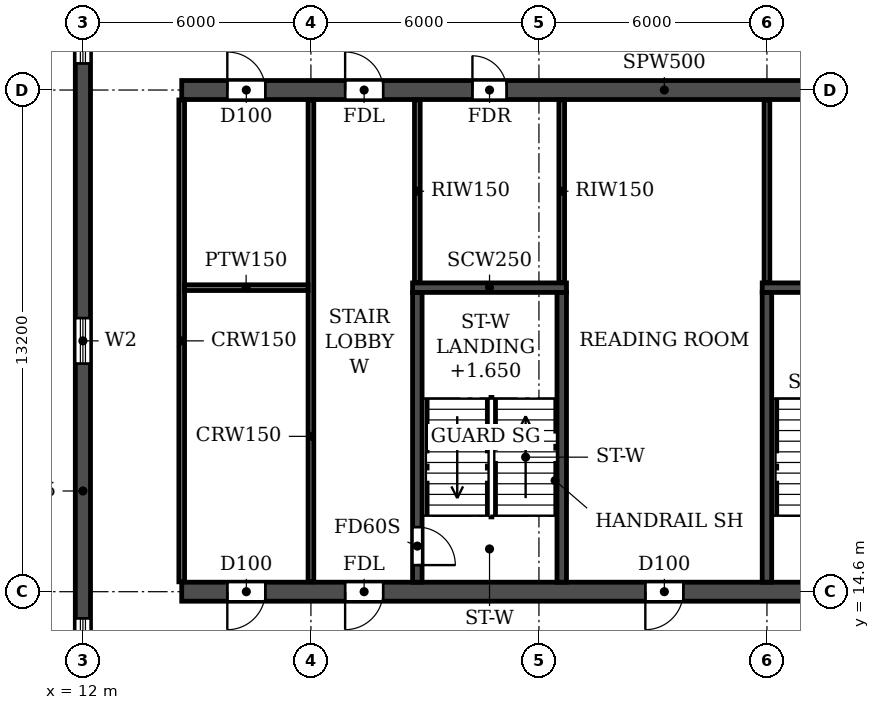
"""IFC4 building model, lengths in metres.
Left out: names, types, materials, properties, quantities, classifications, styles, units other than length and angle.
Written with IfcOpenShell. Run it as: python <this file> out.ifc"""

import sys

from ifc_helpers import new_model, si_unit, direction, frame, frame_2d, origin, place, context, subcontext, project, spatial, rectangle, extrude, element, fill, save


model = new_model("IFC4")
c1 = context("Model", 3, precision=1e-05, world=origin(), true_north=direction((0.0, 1.0)))
c2 = subcontext(c1, "Body", "Model", "MODEL_VIEW")
j1 = project(units=[si_unit("LENGTHUNIT", "METRE"), si_unit("PLANEANGLEUNIT", "RADIAN")], contexts=[c1])
p1 = place(None, origin())
s1 = spatial("IfcSite", under=j1, at=p1, CompositionType="ELEMENT")
p2 = place(p1, origin())
s2 = spatial("IfcBuilding", under=s1, at=p2, CompositionType="ELEMENT")
p3 = place(p2, frame((0.0, 0.0, 109.2)))
s3 = spatial("IfcBuildingStorey", under=s2, at=p3, CompositionType="ELEMENT", Elevation=109.2)
p4 = place(p3, frame((12.0, 4.683, 0.0), z_axis=(0.0, 0.0, 1.0), x_axis=(0.0, 1.0, 0.0)))
e1 = element("IfcWall", 1, at=p4, inside=s3, PredefinedType="SHEAR", context=c2, shape_type="SweptSolid", body=[
    extrude(rectangle(XDim=34.234, YDim=0.4, at=frame_2d((17.117, 0.0))), origin(), (0.0, 0.0, 1.0), 3.06),
])
p5 = place(p4, frame((23.817, 0.0, 0.9)))
e2 = element("IfcOpeningElement", 2, at=p5, cuts=e1, PredefinedType="OPENING", context=c2, shape_type="SweptSolid", body=[
    extrude(rectangle(XDim=1.2, YDim=1.5, at=frame_2d((0.6, 0.75))), frame((0.0, 0.21, 0.0), z_axis=(0.0, -1.0, 0.0), x_axis=(1.0, 0.0, 0.0)), (0.0, 0.0, 1.0), 0.42),
])
p6 = place(p4, frame((8.017, 0.0, 0.9)))
e3 = element("IfcOpeningElement", 3, at=p6, cuts=e1, PredefinedType="OPENING", context=c2, shape_type="SweptSolid", body=[
    extrude(rectangle(XDim=1.2, YDim=1.5, at=frame_2d((0.6, 0.75))), frame((0.0, 0.21, 0.0), z_axis=(0.0, -1.0, 0.0), x_axis=(1.0, 0.0, 0.0)), (0.0, 0.0, 1.0), 0.42),
])
p7 = place(p4, frame((15.917, 0.0, 0.9)))
e4 = element("IfcOpeningElement", 4, at=p7, cuts=e1, PredefinedType="OPENING", context=c2, shape_type="SweptSolid", body=[
    extrude(rectangle(XDim=1.2, YDim=1.5, at=frame_2d((0.6, 0.75))), frame((0.0, 0.21, 0.0), z_axis=(0.0, -1.0, 0.0), x_axis=(1.0, 0.0, 0.0)), (0.0, 0.0, 1.0), 0.42),
])
p8 = place(p4, frame((28.894, 0.0, 0.6)))
e5 = element("IfcOpeningElement", 5, at=p8, cuts=e1, PredefinedType="OPENING", context=c2, shape_type="SweptSolid", body=[
    extrude(rectangle(XDim=2.2, YDim=1.8, at=frame_2d((1.1, 0.9))), frame((0.0, 0.21, 0.0), z_axis=(0.0, -1.0, 0.0), x_axis=(1.0, 0.0, 0.0)), (0.0, 0.0, 1.0), 0.42),
])
p9 = place(p4, frame((2.541, 0.0, 0.6)))
e6 = element("IfcOpeningElement", 6, at=p9, cuts=e1, PredefinedType="OPENING", context=c2, shape_type="SweptSolid", body=[
    extrude(rectangle(XDim=2.2, YDim=1.8, at=frame_2d((1.1, 0.9))), frame((0.0, 0.21, 0.0), z_axis=(0.0, -1.0, 0.0), x_axis=(1.0, 0.0, 0.0)), (0.0, 0.0, 1.0), 0.42),
])
p10 = place(p3, frame((14.6, 14.6, 0.0), z_axis=(0.0, 0.0, 1.0), x_axis=(1.0, 0.0, 0.0)))
e7 = element("IfcWall", 7, at=p10, inside=s3, PredefinedType="SOLIDWALL", context=c2, shape_type="SweptSolid", body=[
    extrude(rectangle(XDim=72.8, YDim=0.5, at=frame_2d((36.4, 0.0))), origin(), (0.0, 0.0, 1.0), 3.06),
])
p11 = place(p10, frame((1.2, 0.0, 0.0)))
e8 = element("IfcOpeningElement", 8, at=p11, cuts=e7, PredefinedType="OPENING", context=c2, shape_type="SweptSolid", body=[
    extrude(rectangle(XDim=1.0, YDim=2.1, at=frame_2d((0.5, 1.05))), frame((0.0, 0.26, 0.0), z_axis=(0.0, -1.0, 0.0), x_axis=(1.0, 0.0, 0.0)), (0.0, 0.0, 1.0), 0.52),
])
p12 = place(p10, frame((4.3, 0.0, 0.0)))
e9 = element("IfcOpeningElement", 9, at=p12, cuts=e7, PredefinedType="OPENING", context=c2, shape_type="SweptSolid", body=[
    extrude(rectangle(XDim=1.0, YDim=2.1, at=frame_2d((0.5, 1.05))), frame((0.0, 0.26, 0.0), z_axis=(0.0, -1.0, 0.0), x_axis=(1.0, 0.0, 0.0)), (0.0, 0.0, 1.0), 0.52),
])
p13 = place(p10, frame((12.2, 0.0, 0.0)))
e10 = element("IfcOpeningElement", 10, at=p13, cuts=e7, PredefinedType="OPENING", context=c2, shape_type="SweptSolid", body=[
    extrude(rectangle(XDim=1.0, YDim=2.1, at=frame_2d((0.5, 1.05))), frame((0.0, 0.26, 0.0), z_axis=(0.0, -1.0, 0.0), x_axis=(1.0, 0.0, 0.0)), (0.0, 0.0, 1.0), 0.52),
])
p14 = place(p10, frame((16.8, 0.0, 0.0)))
e11 = element("IfcOpeningElement", 11, at=p14, cuts=e7, PredefinedType="OPENING", context=c2, shape_type="SweptSolid", body=[
    extrude(rectangle(XDim=1.0, YDim=2.1, at=frame_2d((0.5, 1.05))), frame((0.0, 0.26, 0.0), z_axis=(0.0, -1.0, 0.0), x_axis=(1.0, 0.0, 0.0)), (0.0, 0.0, 1.0), 0.52),
])
p15 = place(p10, frame((28.1, 0.0, 0.0)))
e12 = element("IfcOpeningElement", 12, at=p15, cuts=e7, PredefinedType="OPENING", context=c2, shape_type="SweptSolid", body=[
    extrude(rectangle(XDim=1.0, YDim=2.1, at=frame_2d((0.5, 1.05))), frame((0.0, 0.26, 0.0), z_axis=(0.0, -1.0, 0.0), x_axis=(1.0, 0.0, 0.0)), (0.0, 0.0, 1.0), 0.52),
])
p16 = place(p10, frame((32.0, 0.0, 0.0)))
e13 = element("IfcOpeningElement", 13, at=p16, cuts=e7, PredefinedType="OPENING", context=c2, shape_type="SweptSolid", body=[
    extrude(rectangle(XDim=1.0, YDim=2.1, at=frame_2d((0.5, 1.05))), frame((0.0, 0.26, 0.0), z_axis=(0.0, -1.0, 0.0), x_axis=(1.0, 0.0, 0.0)), (0.0, 0.0, 1.0), 0.52),
])
p17 = place(p10, frame((35.9, 0.0, 0.0)))
e14 = element("IfcOpeningElement", 14, at=p17, cuts=e7, PredefinedType="OPENING", context=c2, shape_type="SweptSolid", body=[
    extrude(rectangle(XDim=1.0, YDim=2.1, at=frame_2d((0.5, 1.05))), frame((0.0, 0.26, 0.0), z_axis=(0.0, -1.0, 0.0), x_axis=(1.0, 0.0, 0.0)), (0.0, 0.0, 1.0), 0.52),
])
p18 = place(p10, frame((39.8, 0.0, 0.0)))
e15 = element("IfcOpeningElement", 15, at=p18, cuts=e7, PredefinedType="OPENING", context=c2, shape_type="SweptSolid", body=[
    extrude(rectangle(XDim=1.0, YDim=2.1, at=frame_2d((0.5, 1.05))), frame((0.0, 0.26, 0.0), z_axis=(0.0, -1.0, 0.0), x_axis=(1.0, 0.0, 0.0)), (0.0, 0.0, 1.0), 0.52),
])
p19 = place(p10, frame((43.7, 0.0, 0.0)))
e16 = element("IfcOpeningElement", 16, at=p19, cuts=e7, PredefinedType="OPENING", context=c2, shape_type="SweptSolid", body=[
    extrude(rectangle(XDim=1.0, YDim=2.1, at=frame_2d((0.5, 1.05))), frame((0.0, 0.26, 0.0), z_axis=(0.0, -1.0, 0.0), x_axis=(1.0, 0.0, 0.0)), (0.0, 0.0, 1.0), 0.52),
])
p20 = place(p10, frame((55.0, 0.0, 0.0)))
e17 = element("IfcOpeningElement", 17, at=p20, cuts=e7, PredefinedType="OPENING", context=c2, shape_type="SweptSolid", body=[
    extrude(rectangle(XDim=1.0, YDim=2.1, at=frame_2d((0.5, 1.05))), frame((0.0, 0.26, 0.0), z_axis=(0.0, -1.0, 0.0), x_axis=(1.0, 0.0, 0.0)), (0.0, 0.0, 1.0), 0.52),
])
p21 = place(p10, frame((59.6, 0.0, 0.0)))
e18 = element("IfcOpeningElement", 18, at=p21, cuts=e7, PredefinedType="OPENING", context=c2, shape_type="SweptSolid", body=[
    extrude(rectangle(XDim=1.0, YDim=2.1, at=frame_2d((0.5, 1.05))), frame((0.0, 0.26, 0.0), z_axis=(0.0, -1.0, 0.0), x_axis=(1.0, 0.0, 0.0)), (0.0, 0.0, 1.0), 0.52),
])
p22 = place(p10, frame((67.5, 0.0, 0.0)))
e19 = element("IfcOpeningElement", 19, at=p22, cuts=e7, PredefinedType="OPENING", context=c2, shape_type="SweptSolid", body=[
    extrude(rectangle(XDim=1.0, YDim=2.1, at=frame_2d((0.5, 1.05))), frame((0.0, 0.26, 0.0), z_axis=(0.0, -1.0, 0.0), x_axis=(1.0, 0.0, 0.0)), (0.0, 0.0, 1.0), 0.52),
])
p23 = place(p10, frame((70.35, 0.0, 0.0)))
e20 = element("IfcOpeningElement", 20, at=p23, cuts=e7, PredefinedType="OPENING", context=c2, shape_type="SweptSolid", body=[
    extrude(rectangle(XDim=1.5, YDim=2.1, at=frame_2d((0.75, 1.05))), frame((0.0, 0.26, 0.0), z_axis=(0.0, -1.0, 0.0), x_axis=(1.0, 0.0, 0.0)), (0.0, 0.0, 1.0), 0.52),
])
p24 = place(p3, frame((14.6, 27.8, 0.0), z_axis=(0.0, 0.0, 1.0), x_axis=(1.0, 0.0, 0.0)))
e21 = element("IfcWall", 21, at=p24, inside=s3, PredefinedType="SOLIDWALL", context=c2, shape_type="SweptSolid", body=[
    extrude(rectangle(XDim=72.8, YDim=0.5, at=frame_2d((36.4, 0.0))), origin(), (0.0, 0.0, 1.0), 3.06),
])
p25 = place(p24, frame((1.2, 0.0, 0.0)))
e22 = element("IfcOpeningElement", 22, at=p25, cuts=e21, PredefinedType="OPENING", context=c2, shape_type="SweptSolid", body=[
    extrude(rectangle(XDim=1.0, YDim=2.1, at=frame_2d((0.5, 1.05))), frame((0.0, 0.26, 0.0), z_axis=(0.0, -1.0, 0.0), x_axis=(1.0, 0.0, 0.0)), (0.0, 0.0, 1.0), 0.52),
])
p26 = place(p24, frame((4.3, 0.0, 0.0)))
e23 = element("IfcOpeningElement", 23, at=p26, cuts=e21, PredefinedType="OPENING", context=c2, shape_type="SweptSolid", body=[
    extrude(rectangle(XDim=1.0, YDim=2.1, at=frame_2d((0.5, 1.05))), frame((0.0, 0.26, 0.0), z_axis=(0.0, -1.0, 0.0), x_axis=(1.0, 0.0, 0.0)), (0.0, 0.0, 1.0), 0.52),
])
p27 = place(p24, frame((7.65, 0.0, 0.0)))
e24 = element("IfcOpeningElement", 24, at=p27, cuts=e21, PredefinedType="OPENING", context=c2, shape_type="SweptSolid", body=[
    extrude(rectangle(XDim=0.9, YDim=2.1, at=frame_2d((0.45, 1.05))), frame((0.0, 0.26, 0.0), z_axis=(0.0, -1.0, 0.0), x_axis=(1.0, 0.0, 0.0)), (0.0, 0.0, 1.0), 0.52),
])
p28 = place(p24, frame((16.85, 0.0, 0.0)))
e25 = element("IfcOpeningElement", 25, at=p28, cuts=e21, PredefinedType="OPENING", context=c2, shape_type="SweptSolid", body=[
    extrude(rectangle(XDim=0.9, YDim=2.1, at=frame_2d((0.45, 1.05))), frame((0.0, 0.26, 0.0), z_axis=(0.0, -1.0, 0.0), x_axis=(1.0, 0.0, 0.0)), (0.0, 0.0, 1.0), 0.52),
])
p29 = place(p24, frame((20.0, 0.0, 0.0)))
e26 = element("IfcOpeningElement", 26, at=p29, cuts=e21, PredefinedType="OPENING", context=c2, shape_type="SweptSolid", body=[
    extrude(rectangle(XDim=1.0, YDim=2.1, at=frame_2d((0.5, 1.05))), frame((0.0, 0.26, 0.0), z_axis=(0.0, -1.0, 0.0), x_axis=(1.0, 0.0, 0.0)), (0.0, 0.0, 1.0), 0.52),
])
p30 = place(p24, frame((25.2, 0.0, 0.0)))
e27 = element("IfcOpeningElement", 27, at=p30, cuts=e21, PredefinedType="OPENING", context=c2, shape_type="SweptSolid", body=[
    extrude(rectangle(XDim=1.0, YDim=2.1, at=frame_2d((0.5, 1.05))), frame((0.0, 0.26, 0.0), z_axis=(0.0, -1.0, 0.0), x_axis=(1.0, 0.0, 0.0)), (0.0, 0.0, 1.0), 0.52),
])
p31 = place(p24, frame((33.0, 0.0, 0.0)))
e28 = element("IfcOpeningElement", 28, at=p31, cuts=e21, PredefinedType="OPENING", context=c2, shape_type="SweptSolid", body=[
    extrude(rectangle(XDim=1.0, YDim=2.1, at=frame_2d((0.5, 1.05))), frame((0.0, 0.26, 0.0), z_axis=(0.0, -1.0, 0.0), x_axis=(1.0, 0.0, 0.0)), (0.0, 0.0, 1.0), 0.52),
])
p32 = place(p24, frame((35.9, 0.0, 0.0)))
e29 = element("IfcOpeningElement", 29, at=p32, cuts=e21, PredefinedType="OPENING", context=c2, shape_type="SweptSolid", body=[
    extrude(rectangle(XDim=1.0, YDim=2.1, at=frame_2d((0.5, 1.05))), frame((0.0, 0.26, 0.0), z_axis=(0.0, -1.0, 0.0), x_axis=(1.0, 0.0, 0.0)), (0.0, 0.0, 1.0), 0.52),
])
p33 = place(p24, frame((38.8, 0.0, 0.0)))
e30 = element("IfcOpeningElement", 30, at=p33, cuts=e21, PredefinedType="OPENING", context=c2, shape_type="SweptSolid", body=[
    extrude(rectangle(XDim=1.0, YDim=2.1, at=frame_2d((0.5, 1.05))), frame((0.0, 0.26, 0.0), z_axis=(0.0, -1.0, 0.0), x_axis=(1.0, 0.0, 0.0)), (0.0, 0.0, 1.0), 0.52),
])
p34 = place(p24, frame((42.7, 0.0, 0.0)))
e31 = element("IfcOpeningElement", 31, at=p34, cuts=e21, PredefinedType="OPENING", context=c2, shape_type="SweptSolid", body=[
    extrude(rectangle(XDim=1.0, YDim=2.1, at=frame_2d((0.5, 1.05))), frame((0.0, 0.26, 0.0), z_axis=(0.0, -1.0, 0.0), x_axis=(1.0, 0.0, 0.0)), (0.0, 0.0, 1.0), 0.52),
])
p35 = place(p24, frame((47.65, 0.0, 0.0)))
e32 = element("IfcOpeningElement", 32, at=p35, cuts=e21, PredefinedType="OPENING", context=c2, shape_type="SweptSolid", body=[
    extrude(rectangle(XDim=1.5, YDim=2.1, at=frame_2d((0.75, 1.05))), frame((0.0, 0.26, 0.0), z_axis=(0.0, -1.0, 0.0), x_axis=(1.0, 0.0, 0.0)), (0.0, 0.0, 1.0), 0.52),
])
p36 = place(p24, frame((51.8, 0.0, 0.0)))
e33 = element("IfcOpeningElement", 33, at=p36, cuts=e21, PredefinedType="OPENING", context=c2, shape_type="SweptSolid", body=[
    extrude(rectangle(XDim=1.0, YDim=2.1, at=frame_2d((0.5, 1.05))), frame((0.0, 0.26, 0.0), z_axis=(0.0, -1.0, 0.0), x_axis=(1.0, 0.0, 0.0)), (0.0, 0.0, 1.0), 0.52),
])
p37 = place(p24, frame((55.05, 0.0, 0.0)))
e34 = element("IfcOpeningElement", 34, at=p37, cuts=e21, PredefinedType="OPENING", context=c2, shape_type="SweptSolid", body=[
    extrude(rectangle(XDim=0.9, YDim=2.1, at=frame_2d((0.45, 1.05))), frame((0.0, 0.26, 0.0), z_axis=(0.0, -1.0, 0.0), x_axis=(1.0, 0.0, 0.0)), (0.0, 0.0, 1.0), 0.52),
])
p38 = place(p24, frame((64.25, 0.0, 0.0)))
e35 = element("IfcOpeningElement", 35, at=p38, cuts=e21, PredefinedType="OPENING", context=c2, shape_type="SweptSolid", body=[
    extrude(rectangle(XDim=0.9, YDim=2.1, at=frame_2d((0.45, 1.05))), frame((0.0, 0.26, 0.0), z_axis=(0.0, -1.0, 0.0), x_axis=(1.0, 0.0, 0.0)), (0.0, 0.0, 1.0), 0.52),
])
p39 = place(p24, frame((67.5, 0.0, 0.0)))
e36 = element("IfcOpeningElement", 36, at=p39, cuts=e21, PredefinedType="OPENING", context=c2, shape_type="SweptSolid", body=[
    extrude(rectangle(XDim=1.0, YDim=2.1, at=frame_2d((0.5, 1.05))), frame((0.0, 0.26, 0.0), z_axis=(0.0, -1.0, 0.0), x_axis=(1.0, 0.0, 0.0)), (0.0, 0.0, 1.0), 0.52),
])
p40 = place(p24, frame((70.6, 0.0, 0.0)))
e37 = element("IfcOpeningElement", 37, at=p40, cuts=e21, PredefinedType="OPENING", context=c2, shape_type="SweptSolid", body=[
    extrude(rectangle(XDim=1.0, YDim=2.1, at=frame_2d((0.5, 1.05))), frame((0.0, 0.26, 0.0), z_axis=(0.0, -1.0, 0.0), x_axis=(1.0, 0.0, 0.0)), (0.0, 0.0, 1.0), 0.52),
])
p41 = place(p3, frame((30.0, 14.85, 0.0), z_axis=(0.0, 0.0, 1.0), x_axis=(0.0, 1.0, 0.0)))
e38 = element("IfcWall", 38, at=p41, inside=s3, PredefinedType="SOLIDWALL", context=c2, shape_type="SweptSolid", body=[
    extrude(rectangle(XDim=7.625, YDim=0.25, at=frame_2d((3.812, 0.0))), origin(), (0.0, 0.0, 1.0), 3.06),
])
p42 = place(p3, frame((29.875, 22.6, 0.0), z_axis=(0.0, 0.0, 1.0), x_axis=(1.0, 0.0, 0.0)))
e39 = element("IfcWall", 39, at=p42, inside=s3, PredefinedType="SOLIDWALL", context=c2, shape_type="SweptSolid", body=[
    extrude(rectangle(XDim=4.05, YDim=0.25, at=frame_2d((2.025, 0.0))), origin(), (0.0, 0.0, 1.0), 3.06),
])
p43 = place(p3, frame((20.8, 14.85, 0.0), z_axis=(0.0, 0.0, 1.0), x_axis=(0.0, 1.0, 0.0)))
e40 = element("IfcWall", 40, at=p43, inside=s3, PredefinedType="SOLIDWALL", context=c2, shape_type="SweptSolid", body=[
    extrude(rectangle(XDim=7.625, YDim=0.25, at=frame_2d((3.812, 0.0))), origin(), (0.0, 0.0, 1.0), 3.06),
])
p44 = place(p43, frame((0.45, 0.0, 0.0)))
e41 = element("IfcOpeningElement", 41, at=p44, cuts=e40, PredefinedType="OPENING", context=c2, shape_type="SweptSolid", body=[
    extrude(rectangle(XDim=1.0, YDim=2.1, at=frame_2d((0.5, 1.05))), frame((0.0, 0.135, 0.0), z_axis=(0.0, -1.0, 0.0), x_axis=(1.0, 0.0, 0.0)), (0.0, 0.0, 1.0), 0.27),
])
p45 = place(p3, frame((24.6, 14.85, 0.0), z_axis=(0.0, 0.0, 1.0), x_axis=(0.0, 1.0, 0.0)))
e42 = element("IfcWall", 42, at=p45, inside=s3, PredefinedType="SOLIDWALL", context=c2, shape_type="SweptSolid", body=[
    extrude(rectangle(XDim=7.625, YDim=0.25, at=frame_2d((3.812, 0.0))), origin(), (0.0, 0.0, 1.0), 3.06),
])
p46 = place(p3, frame((20.675, 22.6, 0.0), z_axis=(0.0, 0.0, 1.0), x_axis=(1.0, 0.0, 0.0)))
e43 = element("IfcWall", 43, at=p46, inside=s3, PredefinedType="SOLIDWALL", context=c2, shape_type="SweptSolid", body=[
    extrude(rectangle(XDim=4.05, YDim=0.25, at=frame_2d((2.025, 0.0))), origin(), (0.0, 0.0, 1.0), 3.06),
])
for number, where, z_axis, x_axis in (
    (44, (14.6, 14.86, 0.0), (0.0, 0.0, 1.0), (0.0, 1.0, 0.0)),
    (45, (18.0, 14.86, 0.0), (0.0, 0.0, 1.0), (0.0, 1.0, 0.0)),
):
    element("IfcWall", number, at=place(p3, frame(where, z_axis=z_axis, x_axis=x_axis)), inside=s3, PredefinedType="PARTITIONING", context=c2, shape_type="SweptSolid", body=[
        extrude(rectangle(XDim=12.68, YDim=0.15, at=frame_2d((6.34, 0.0))), origin(), (0.0, 0.0, 1.0), 3.06),
    ])
p47 = place(p3, frame((14.675, 22.6, 0.0), z_axis=(0.0, 0.0, 1.0), x_axis=(1.0, 0.0, 0.0)))
e46 = element("IfcWall", 46, at=p47, inside=s3, PredefinedType="PARTITIONING", context=c2, shape_type="SweptSolid", body=[
    extrude(rectangle(XDim=3.25, YDim=0.15, at=frame_2d((1.625, 0.0))), origin(), (0.0, 0.0, 1.0), 3.06),
])
for number, where, z_axis, x_axis in (
    (47, (20.8, 22.735, 0.0), (0.0, 0.0, 1.0), (0.0, 1.0, 0.0)),
    (48, (24.6, 22.735, 0.0), (0.0, 0.0, 1.0), (0.0, 1.0, 0.0)),
    (49, (30.0, 22.735, 0.0), (0.0, 0.0, 1.0), (0.0, 1.0, 0.0)),
):
    element("IfcWall", number, at=place(p3, frame(where, z_axis=z_axis, x_axis=x_axis)), inside=s3, PredefinedType="PARTITIONING", context=c2, shape_type="SweptSolid", body=[
        extrude(rectangle(XDim=4.805, YDim=0.15, at=frame_2d((2.402, 0.0))), origin(), (0.0, 0.0, 1.0), 3.06),
    ])
p48 = place(p5, origin())
e50 = element("IfcWindow", 50, at=p48, inside=s3, PartitioningType="SINGLE_PANEL", PredefinedType="WINDOW", context=c2, shape_type="SweptSolid", body=[
    extrude(rectangle(XDim=1.2, YDim=1.5, at=frame_2d((0.6, 0.75))), frame((0.0, 0.03, 0.0), z_axis=(0.0, -1.0, 0.0), x_axis=(1.0, 0.0, 0.0)), (0.0, 0.0, 1.0), 0.06),
])
fill(e2, e50)
p49 = place(p6, origin())
e51 = element("IfcWindow", 51, at=p49, inside=s3, PartitioningType="SINGLE_PANEL", PredefinedType="WINDOW", context=c2, shape_type="SweptSolid", body=[
    extrude(rectangle(XDim=1.2, YDim=1.5, at=frame_2d((0.6, 0.75))), frame((0.0, 0.03, 0.0), z_axis=(0.0, -1.0, 0.0), x_axis=(1.0, 0.0, 0.0)), (0.0, 0.0, 1.0), 0.06),
])
fill(e3, e51)
p50 = place(p7, origin())
e52 = element("IfcWindow", 52, at=p50, inside=s3, PartitioningType="SINGLE_PANEL", PredefinedType="WINDOW", context=c2, shape_type="SweptSolid", body=[
    extrude(rectangle(XDim=1.2, YDim=1.5, at=frame_2d((0.6, 0.75))), frame((0.0, 0.03, 0.0), z_axis=(0.0, -1.0, 0.0), x_axis=(1.0, 0.0, 0.0)), (0.0, 0.0, 1.0), 0.06),
])
fill(e4, e52)
p51 = place(p25, origin())
e53 = element("IfcDoor", 53, at=p51, inside=s3, OperationType="SINGLE_SWING_LEFT", PredefinedType="DOOR", context=c2, shape_type="SweptSolid", body=[
    extrude(rectangle(XDim=1.0, YDim=2.1, at=frame_2d((0.5, 1.05))), frame((0.0, 0.025, 0.0), z_axis=(0.0, -1.0, 0.0), x_axis=(1.0, 0.0, 0.0)), (0.0, 0.0, 1.0), 0.05),
])
fill(e22, e53)
p52 = place(p26, origin())
e54 = element("IfcDoor", 54, at=p52, inside=s3, OperationType="SINGLE_SWING_LEFT", PredefinedType="DOOR", context=c2, shape_type="SweptSolid", body=[
    extrude(rectangle(XDim=1.0, YDim=2.1, at=frame_2d((0.5, 1.05))), frame((0.0, 0.025, 0.0), z_axis=(0.0, -1.0, 0.0), x_axis=(1.0, 0.0, 0.0)), (0.0, 0.0, 1.0), 0.05),
])
fill(e23, e54)
p53 = place(p27, origin())
e55 = element("IfcDoor", 55, at=p53, inside=s3, OperationType="SINGLE_SWING_LEFT", PredefinedType="DOOR", context=c2, shape_type="SweptSolid", body=[
    extrude(rectangle(XDim=0.9, YDim=2.1, at=frame_2d((0.45, 1.05))), frame((0.0, 0.025, 0.0), z_axis=(0.0, -1.0, 0.0), x_axis=(1.0, 0.0, 0.0)), (0.0, 0.0, 1.0), 0.05),
])
fill(e24, e55)
p54 = place(p11, frame((1.0, 0.0, 0.0), z_axis=(0.0, 0.0, 1.0), x_axis=(-1.0, 0.0, 0.0)))
e56 = element("IfcDoor", 56, at=p54, inside=s3, OperationType="SINGLE_SWING_RIGHT", PredefinedType="DOOR", context=c2, shape_type="SweptSolid", body=[
    extrude(rectangle(XDim=1.0, YDim=2.1, at=frame_2d((0.5, 1.05))), frame((0.0, 0.025, 0.0), z_axis=(0.0, -1.0, 0.0), x_axis=(1.0, 0.0, 0.0)), (0.0, 0.0, 1.0), 0.05),
])
fill(e8, e56)
p55 = place(p12, frame((1.0, 0.0, 0.0), z_axis=(0.0, 0.0, 1.0), x_axis=(-1.0, 0.0, 0.0)))
e57 = element("IfcDoor", 57, at=p55, inside=s3, OperationType="SINGLE_SWING_RIGHT", PredefinedType="DOOR", context=c2, shape_type="SweptSolid", body=[
    extrude(rectangle(XDim=1.0, YDim=2.1, at=frame_2d((0.5, 1.05))), frame((0.0, 0.025, 0.0), z_axis=(0.0, -1.0, 0.0), x_axis=(1.0, 0.0, 0.0)), (0.0, 0.0, 1.0), 0.05),
])
fill(e9, e57)
p56 = place(p13, frame((1.0, 0.0, 0.0), z_axis=(0.0, 0.0, 1.0), x_axis=(-1.0, 0.0, 0.0)))
e58 = element("IfcDoor", 58, at=p56, inside=s3, OperationType="SINGLE_SWING_RIGHT", PredefinedType="DOOR", context=c2, shape_type="SweptSolid", body=[
    extrude(rectangle(XDim=1.0, YDim=2.1, at=frame_2d((0.5, 1.05))), frame((0.0, 0.025, 0.0), z_axis=(0.0, -1.0, 0.0), x_axis=(1.0, 0.0, 0.0)), (0.0, 0.0, 1.0), 0.05),
])
fill(e10, e58)
p57 = place(p44, frame((1.0, 0.0, 0.0), z_axis=(0.0, 0.0, 1.0), x_axis=(-1.0, 0.0, 0.0)))
e59 = element("IfcDoor", 59, at=p57, inside=s3, OperationType="SINGLE_SWING_RIGHT", PredefinedType="DOOR", context=c2, shape_type="SweptSolid", body=[
    extrude(rectangle(XDim=1.0, YDim=2.1, at=frame_2d((0.5, 1.05))), frame((0.0, 0.025, 0.0), z_axis=(0.0, -1.0, 0.0), x_axis=(1.0, 0.0, 0.0)), (0.0, 0.0, 1.0), 0.05),
])
fill(e41, e59)
save(model, sys.argv[1])
